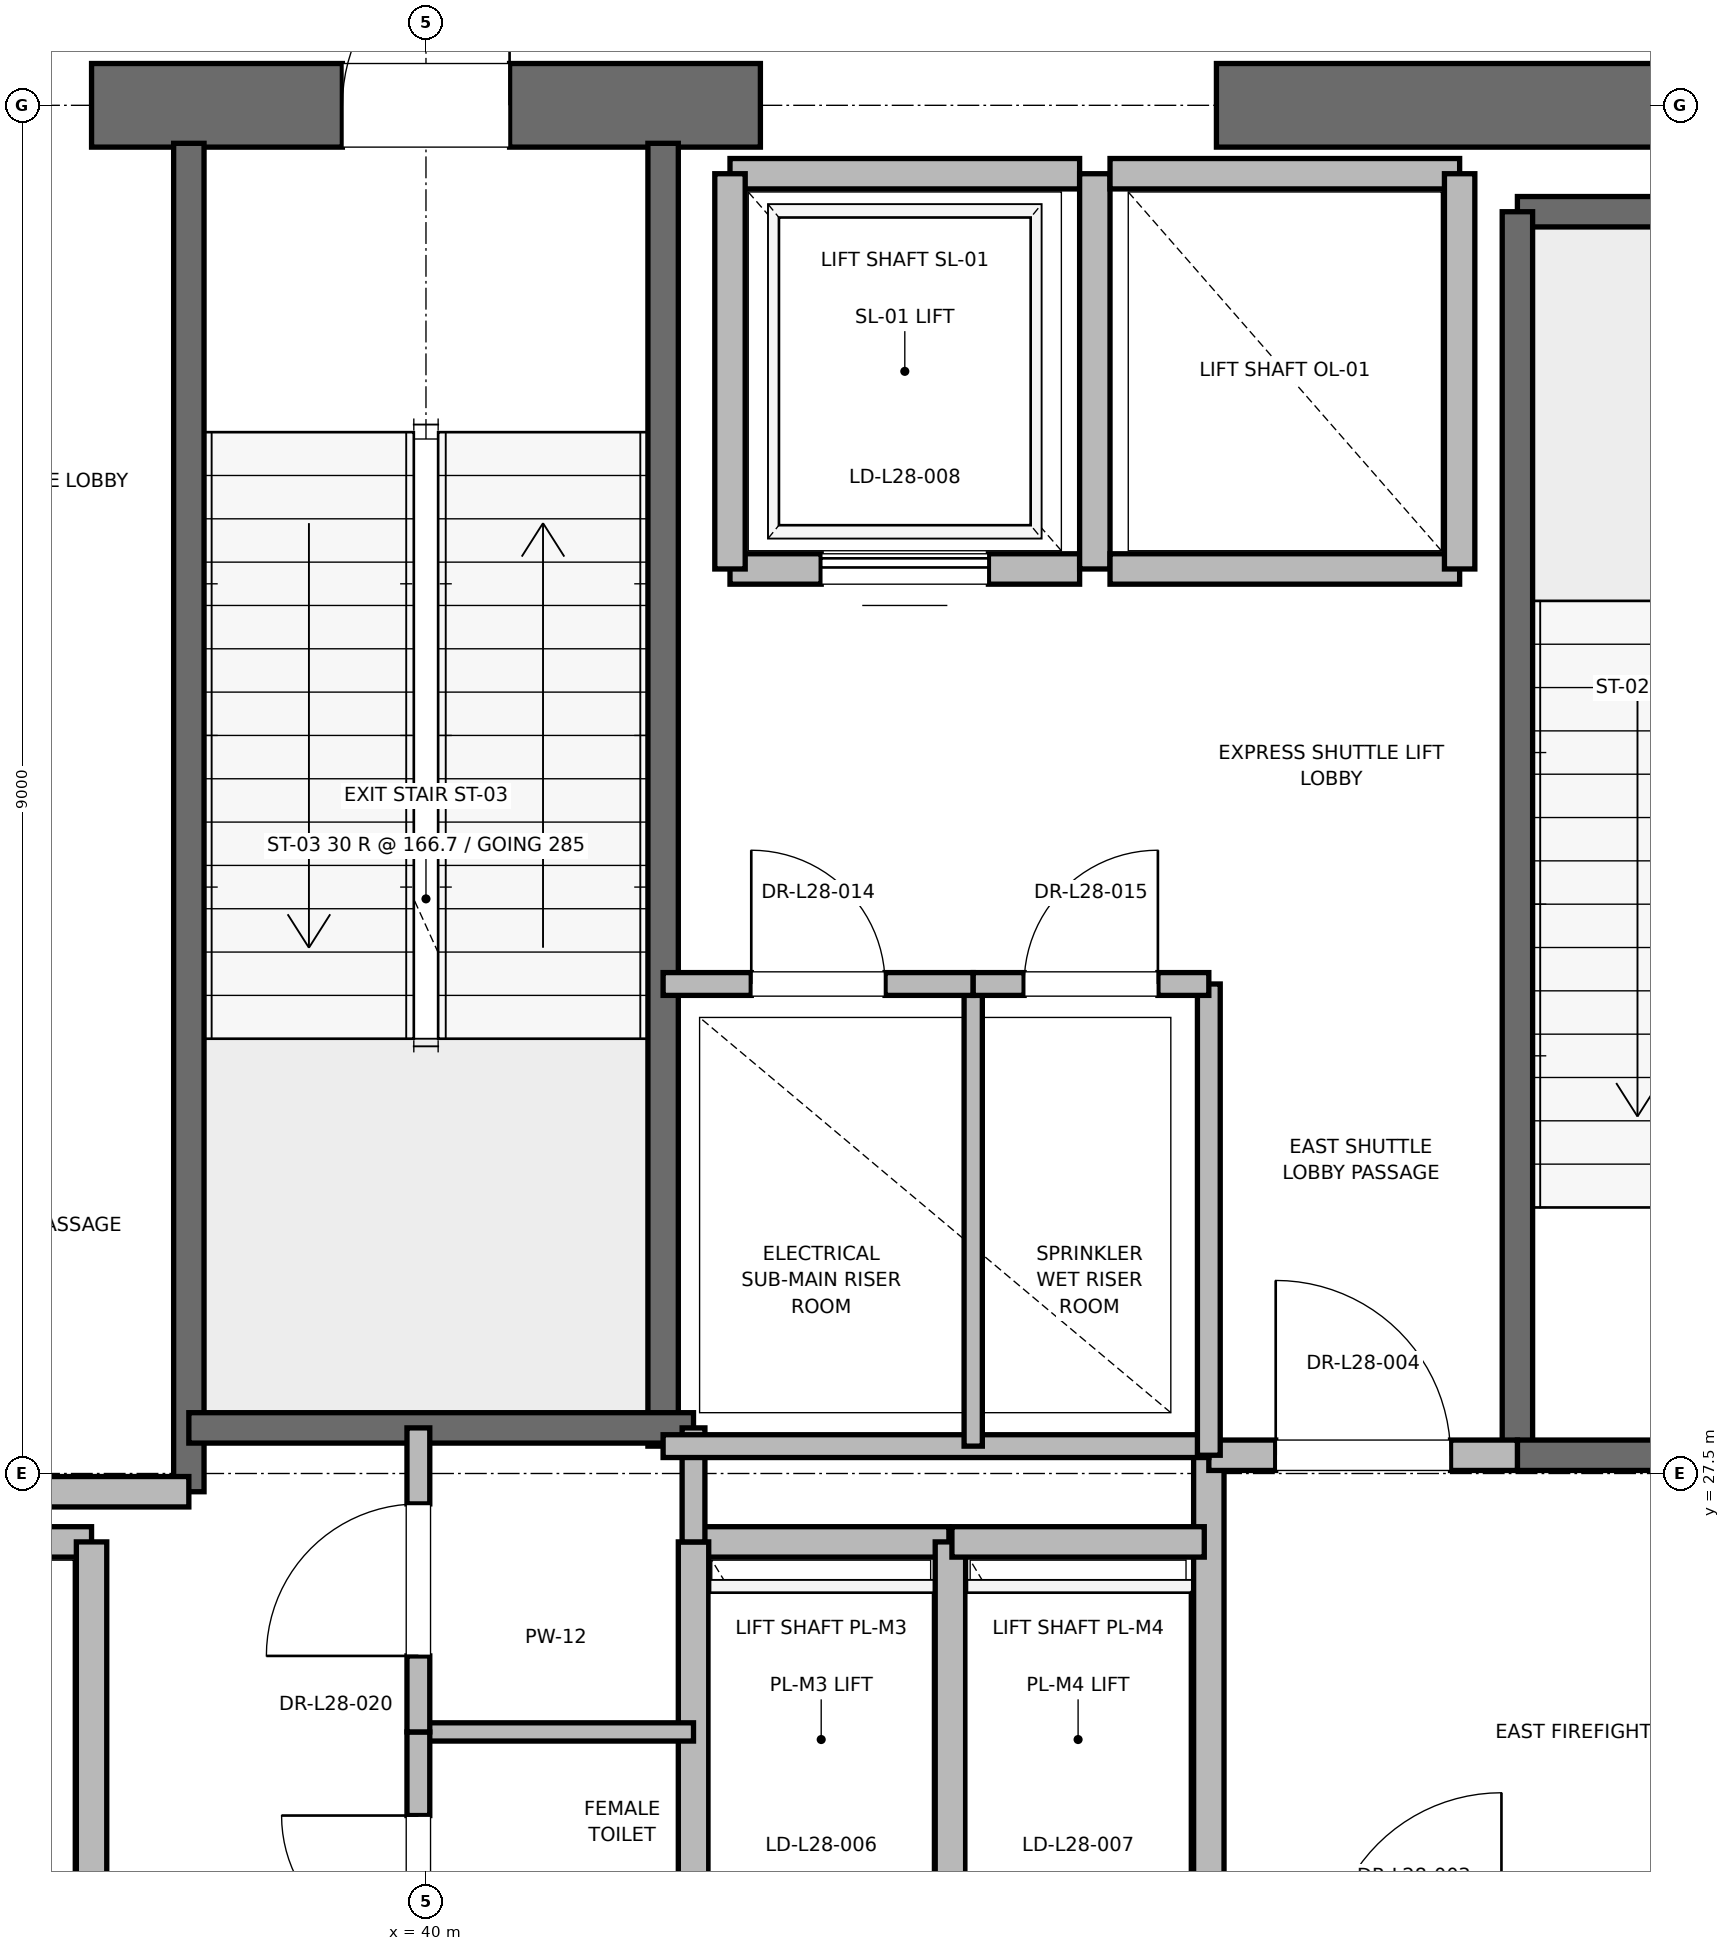
"""IFC4 building model, lengths in metres.
Left out: names, types, materials, properties, quantities, classifications, styles, units other than length and angle.
Written with IfcOpenShell. Run it as: python <this file> out.ifc"""

import sys

from ifc_helpers import new_model, si_unit, direction, frame, frame_2d, origin, place, context, subcontext, project, spatial, rectangle, extrude, element, fill, save


model = new_model("IFC4")
c1 = context("Model", 3, precision=1e-05, world=origin(), true_north=direction((0.0, 1.0)))
c2 = subcontext(c1, "Body", "Model", "MODEL_VIEW")
j1 = project(units=[si_unit("LENGTHUNIT", "METRE"), si_unit("PLANEANGLEUNIT", "RADIAN")], contexts=[c1])
p1 = place(None, origin())
s1 = spatial("IfcSite", under=j1, at=p1, CompositionType="ELEMENT")
p2 = place(p1, origin())
s2 = spatial("IfcBuilding", under=s1, at=p2, CompositionType="ELEMENT")
p3 = place(p2, frame((0.0, 0.0, 123.4)))
s3 = spatial("IfcBuildingStorey", under=s2, at=p3, CompositionType="ELEMENT", Elevation=123.4)
p4 = place(p3, frame((37.8, 36.5, 0.0), z_axis=(0.0, 0.0, 1.0), x_axis=(1.0, 0.0, 0.0)))
e1 = element("IfcWall", 1, at=p4, inside=s3, PredefinedType="SHEAR", context=c2, shape_type="SweptSolid", body=[
    extrude(rectangle(XDim=4.4, YDim=0.55, at=frame_2d((2.2, 0.0))), origin(), (0.0, 0.0, 1.0), 4.775),
])
p5 = place(p4, frame((1.65, 0.0, 0.0)))
e2 = element("IfcOpeningElement", 2, at=p5, cuts=e1, PredefinedType="OPENING", context=c2, shape_type="SweptSolid", body=[
    extrude(rectangle(XDim=1.1, YDim=2.15, at=frame_2d((0.55, 1.075))), frame((0.0, 0.275, 0.0), z_axis=(0.0, -1.0, 0.0), x_axis=(1.0, 0.0, 0.0)), (0.0, 0.0, 1.0), 0.55),
])
p6 = place(p3, frame((45.2, 36.5, 0.0), z_axis=(0.0, 0.0, 1.0), x_axis=(1.0, 0.0, 0.0)))
e3 = element("IfcWall", 3, at=p6, inside=s3, PredefinedType="SHEAR", context=c2, shape_type="SweptSolid", body=[
    extrude(rectangle(XDim=5.8, YDim=0.55, at=frame_2d((2.9, 0.0))), origin(), (0.0, 0.0, 1.0), 4.775),
])
p7 = place(p3, frame((47.18, 35.8, 0.0), z_axis=(0.0, 0.0, 1.0), x_axis=(1.0, 0.0, 0.0)))
e4 = element("IfcWall", 4, at=p7, inside=s3, PredefinedType="SOLIDWALL", context=c2, shape_type="SweptSolid", body=[
    extrude(rectangle(XDim=3.12, YDim=0.2, at=frame_2d((1.56, 0.0))), origin(), (0.0, 0.0, 1.0), 4.775),
])
p8 = place(p3, frame((47.18, 27.62, 0.0), z_axis=(0.0, 0.0, 1.0), x_axis=(0.0, 1.0, 0.0)))
e5 = element("IfcWall", 5, at=p8, inside=s3, PredefinedType="SOLIDWALL", context=c2, shape_type="SweptSolid", body=[
    extrude(rectangle(XDim=8.18, YDim=0.2, at=frame_2d((4.09, 0.0))), origin(), (0.0, 0.0, 1.0), 4.775),
])
p9 = place(p3, frame((47.18, 27.62, 0.0), z_axis=(0.0, 0.0, 1.0), x_axis=(1.0, 0.0, 0.0)))
e6 = element("IfcWall", 6, at=p9, inside=s3, PredefinedType="SOLIDWALL", context=c2, shape_type="SweptSolid", body=[
    extrude(rectangle(XDim=3.12, YDim=0.2, at=frame_2d((1.56, 0.0))), origin(), (0.0, 0.0, 1.0), 4.775),
])
p10 = place(p9, frame((1.01, 0.0, 0.0)))
e7 = element("IfcOpeningElement", 7, at=p10, cuts=e6, PredefinedType="OPENING", context=c2, shape_type="SweptSolid", body=[
    extrude(rectangle(XDim=1.1, YDim=2.15, at=frame_2d((0.55, 1.075))), frame((0.0, 0.1, 0.0), z_axis=(0.0, -1.0, 0.0), x_axis=(1.0, 0.0, 0.0)), (0.0, 0.0, 1.0), 0.2),
])
p11 = place(p3, frame((38.44, 27.38, 0.0), z_axis=(0.0, 0.0, 1.0), x_axis=(0.0, 1.0, 0.0)))
e8 = element("IfcWall", 8, at=p11, inside=s3, PredefinedType="SOLIDWALL", context=c2, shape_type="SweptSolid", body=[
    extrude(rectangle(XDim=8.87, YDim=0.2, at=frame_2d((4.435, 0.0))), origin(), (0.0, 0.0, 1.0), 4.775),
])
p12 = place(p3, frame((41.56, 27.68, 0.0), z_axis=(0.0, 0.0, 1.0), x_axis=(0.0, 1.0, 0.0)))
e9 = element("IfcWall", 9, at=p12, inside=s3, PredefinedType="SOLIDWALL", context=c2, shape_type="SweptSolid", body=[
    extrude(rectangle(XDim=8.57, YDim=0.2, at=frame_2d((4.285, 0.0))), origin(), (0.0, 0.0, 1.0), 4.775),
])
p13 = place(p3, frame((38.44, 27.8, 0.0), z_axis=(0.0, 0.0, 1.0), x_axis=(1.0, 0.0, 0.0)))
e10 = element("IfcWall", 10, at=p13, inside=s3, PredefinedType="SOLIDWALL", context=c2, shape_type="SweptSolid", body=[
    extrude(rectangle(XDim=3.32, YDim=0.2, at=frame_2d((1.66, 0.0))), origin(), (0.0, 0.0, 1.0), 4.775),
])
p14 = place(p3, frame((32.82, 27.38, 0.0), z_axis=(0.0, 0.0, 1.0), x_axis=(1.0, 0.0, 0.0)))
e11 = element("IfcWall", 11, at=p14, inside=s3, PredefinedType="PARTITIONING", context=c2, shape_type="SweptSolid", body=[
    extrude(rectangle(XDim=5.62, YDim=0.2, at=frame_2d((2.81, 0.0))), origin(), (0.0, 0.0, 1.0), 4.775),
])
p15 = place(p3, frame((45.15, 24.25, 0.0), z_axis=(0.0, 0.0, 1.0), x_axis=(0.0, 1.0, 0.0)))
e12 = element("IfcWall", 12, at=p15, inside=s3, PredefinedType="PARTITIONING", context=c2, shape_type="SweptSolid", body=[
    extrude(rectangle(XDim=3.37, YDim=0.2, at=frame_2d((1.685, 0.0))), origin(), (0.0, 0.0, 1.0), 4.775),
])
p16 = place(p3, frame((45.15, 27.62, 0.0), z_axis=(0.0, 0.0, 1.0), x_axis=(1.0, 0.0, 0.0)))
e13 = element("IfcWall", 13, at=p16, inside=s3, PredefinedType="PARTITIONING", context=c2, shape_type="SweptSolid", body=[
    extrude(rectangle(XDim=2.03, YDim=0.2, at=frame_2d((1.015, 0.0))), origin(), (0.0, 0.0, 1.0), 4.775),
])
p17 = place(p16, frame((0.44, 0.0, 0.0)))
e14 = element("IfcOpeningElement", 14, at=p17, cuts=e13, PredefinedType="OPENING", context=c2, shape_type="SweptSolid", body=[
    extrude(rectangle(XDim=1.15, YDim=2.2, at=frame_2d((0.575, 1.1))), frame((0.0, 0.1, 0.0), z_axis=(0.0, -1.0, 0.0), x_axis=(1.0, 0.0, 0.0)), (0.0, 0.0, 1.0), 0.2),
])
p18 = place(p3, frame((37.8, 27.05, 0.0), z_axis=(0.0, 0.0, 1.0), x_axis=(-1.0, 0.0, 0.0)))
e15 = element("IfcWall", 15, at=p18, inside=s3, PredefinedType="SOLIDWALL", context=c2, shape_type="SweptSolid", body=[
    extrude(rectangle(XDim=2.3, YDim=0.2, at=frame_2d((1.15, 0.0))), origin(), (0.0, 0.0, 1.0), 4.775),
])
p19 = place(p3, frame((37.8, 24.45, 0.0), z_axis=(0.0, 0.0, 1.0), x_axis=(0.0, 1.0, 0.0)))
e16 = element("IfcWall", 16, at=p19, inside=s3, PredefinedType="SOLIDWALL", context=c2, shape_type="SweptSolid", body=[
    extrude(rectangle(XDim=2.6, YDim=0.2, at=frame_2d((1.3, 0.0))), origin(), (0.0, 0.0, 1.0), 4.775),
])
p20 = place(p3, frame((43.44, 27.05, 0.0), z_axis=(0.0, 0.0, 1.0), x_axis=(-1.0, 0.0, 0.0)))
e17 = element("IfcWall", 17, at=p20, inside=s3, PredefinedType="SOLIDWALL", context=c2, shape_type="SweptSolid", body=[
    extrude(rectangle(XDim=1.68, YDim=0.2, at=frame_2d((0.84, 0.0))), origin(), (0.0, 0.0, 1.0), 4.775),
])
for number, where, z_axis, x_axis in (
    (18, (41.76, 27.05, 0.0), (0.0, 0.0, 1.0), (0.0, -1.0, 0.0)),
    (19, (43.45, 24.45, 0.0), (0.0, 0.0, 1.0), (0.0, 1.0, 0.0)),
):
    element("IfcWall", number, at=place(p3, frame(where, z_axis=z_axis, x_axis=x_axis)), inside=s3, PredefinedType="SOLIDWALL", context=c2, shape_type="SweptSolid", body=[
        extrude(rectangle(XDim=2.6, YDim=0.2, at=frame_2d((1.3, 0.0))), origin(), (0.0, 0.0, 1.0), 4.775),
    ])
p21 = place(p3, frame((45.12, 27.05, 0.0), z_axis=(0.0, 0.0, 1.0), x_axis=(-1.0, 0.0, 0.0)))
e20 = element("IfcWall", 20, at=p21, inside=s3, PredefinedType="SOLIDWALL", context=c2, shape_type="SweptSolid", body=[
    extrude(rectangle(XDim=1.66, YDim=0.2, at=frame_2d((0.83, 0.0))), origin(), (0.0, 0.0, 1.0), 4.775),
])
p22 = place(p3, frame((42.0, 33.45, 0.0), z_axis=(0.0, 0.0, 1.0), x_axis=(1.0, 0.0, 0.0)))
e21 = element("IfcWall", 21, at=p22, inside=s3, PredefinedType="SOLIDWALL", context=c2, shape_type="SweptSolid", body=[
    extrude(rectangle(XDim=2.3, YDim=0.2, at=frame_2d((1.15, 0.0))), origin(), (0.0, 0.0, 1.0), 4.775),
])
p23 = place(p22, frame((0.6, 0.0, 0.0)))
e22 = element("IfcOpeningElement", 22, at=p23, cuts=e21, PredefinedType="OPENING", context=c2, shape_type="SweptSolid", body=[
    extrude(rectangle(XDim=1.1, YDim=2.2, at=frame_2d((0.55, 1.1))), frame((0.0, 0.1, 0.0), z_axis=(0.0, -1.0, 0.0), x_axis=(1.0, 0.0, 0.0)), (0.0, 0.0, 1.0), 0.2),
])
p24 = place(p3, frame((44.3, 36.05, 0.0), z_axis=(0.0, 0.0, 1.0), x_axis=(-1.0, 0.0, 0.0)))
e23 = element("IfcWall", 23, at=p24, inside=s3, PredefinedType="SOLIDWALL", context=c2, shape_type="SweptSolid", body=[
    extrude(rectangle(XDim=2.3, YDim=0.2, at=frame_2d((1.15, 0.0))), origin(), (0.0, 0.0, 1.0), 3.755),
])
for number, where, z_axis, x_axis in (
    (24, (42.0, 36.05, 0.0), (0.0, 0.0, 1.0), (0.0, -1.0, 0.0)),
    (25, (44.4, 33.45, 0.0), (0.0, 0.0, 1.0), (0.0, 1.0, 0.0)),
):
    element("IfcWall", number, at=place(p3, frame(where, z_axis=z_axis, x_axis=x_axis)), inside=s3, PredefinedType="SOLIDWALL", context=c2, shape_type="SweptSolid", body=[
        extrude(rectangle(XDim=2.6, YDim=0.2, at=frame_2d((1.3, 0.0))), origin(), (0.0, 0.0, 1.0), 3.755),
    ])
p25 = place(p3, frame((44.5, 33.45, 0.0), z_axis=(0.0, 0.0, 1.0), x_axis=(1.0, 0.0, 0.0)))
e26 = element("IfcWall", 26, at=p25, inside=s3, PredefinedType="SOLIDWALL", context=c2, shape_type="SweptSolid", body=[
    extrude(rectangle(XDim=2.3, YDim=0.2, at=frame_2d((1.15, 0.0))), origin(), (0.0, 0.0, 1.0), 4.775),
])
p26 = place(p3, frame((46.8, 36.05, 0.0), z_axis=(0.0, 0.0, 1.0), x_axis=(-1.0, 0.0, 0.0)))
e27 = element("IfcWall", 27, at=p26, inside=s3, PredefinedType="SOLIDWALL", context=c2, shape_type="SweptSolid", body=[
    extrude(rectangle(XDim=2.3, YDim=0.2, at=frame_2d((1.15, 0.0))), origin(), (0.0, 0.0, 1.0), 3.755),
])
p27 = place(p3, frame((46.8, 33.45, 0.0), z_axis=(0.0, 0.0, 1.0), x_axis=(0.0, 1.0, 0.0)))
e28 = element("IfcWall", 28, at=p27, inside=s3, PredefinedType="SOLIDWALL", context=c2, shape_type="SweptSolid", body=[
    extrude(rectangle(XDim=2.6, YDim=0.2, at=frame_2d((1.3, 0.0))), origin(), (0.0, 0.0, 1.0), 4.775),
])
p28 = place(p3, frame((39.95, 25.8, 0.0), z_axis=(0.0, 0.0, 1.0), x_axis=(1.0, 0.0, 0.0)))
e29 = element("IfcWall", 29, at=p28, inside=s3, PredefinedType="PARTITIONING", context=c2, shape_type="SweptSolid", body=[
    extrude(rectangle(XDim=1.81, YDim=0.12, at=frame_2d((0.905, 0.0))), origin(), (0.0, 0.0, 1.0), 2.85),
])
p29 = place(p3, frame((41.76, 27.05, 0.0), z_axis=(0.0, 0.0, 1.0), x_axis=(0.0, 1.0, 0.0)))
e30 = element("IfcWall", 30, at=p29, inside=s3, PredefinedType="PARTITIONING", context=c2, shape_type="SweptSolid", body=[
    extrude(rectangle(XDim=0.75, YDim=0.15, at=frame_2d((0.375, 0.0))), origin(), (0.0, 0.0, 1.0), 2.85),
])
p30 = place(p3, frame((39.95, 23.8, 0.0), z_axis=(0.0, 0.0, 1.0), x_axis=(0.0, 1.0, 0.0)))
e31 = element("IfcWall", 31, at=p30, inside=s3, PredefinedType="PARTITIONING", context=c2, shape_type="SweptSolid", body=[
    extrude(rectangle(XDim=2.0, YDim=0.15, at=frame_2d((1.0, 0.0))), origin(), (0.0, 0.0, 1.0), 2.85),
])
p31 = place(p30, frame((0.55, 0.0, 0.0)))
e32 = element("IfcOpeningElement", 32, at=p31, cuts=e31, PredefinedType="OPENING", context=c2, shape_type="SweptSolid", body=[
    extrude(rectangle(XDim=0.9, YDim=2.1, at=frame_2d((0.45, 1.05))), frame((0.0, 0.075, 0.0), z_axis=(0.0, -1.0, 0.0), x_axis=(1.0, 0.0, 0.0)), (0.0, 0.0, 1.0), 0.15),
])
p32 = place(p3, frame((39.95, 25.8, 0.0), z_axis=(0.0, 0.0, 1.0), x_axis=(0.0, 1.0, 0.0)))
e33 = element("IfcWall", 33, at=p32, inside=s3, PredefinedType="PARTITIONING", context=c2, shape_type="SweptSolid", body=[
    extrude(rectangle(XDim=2.0, YDim=0.15, at=frame_2d((1.0, 0.0))), origin(), (0.0, 0.0, 1.0), 2.85),
])
p33 = place(p32, frame((0.5, 0.0, 0.0)))
e34 = element("IfcOpeningElement", 34, at=p33, cuts=e33, PredefinedType="OPENING", context=c2, shape_type="SweptSolid", body=[
    extrude(rectangle(XDim=1.0, YDim=2.15, at=frame_2d((0.5, 1.075))), frame((0.0, 0.075, 0.0), z_axis=(0.0, -1.0, 0.0), x_axis=(1.0, 0.0, 0.0)), (0.0, 0.0, 1.0), 0.15),
])
p34 = place(p3, frame((41.56, 27.68, 0.0), z_axis=(0.0, 0.0, 1.0), x_axis=(1.0, 0.0, 0.0)))
e35 = element("IfcWall", 35, at=p34, inside=s3, PredefinedType="PARTITIONING", context=c2, shape_type="SweptSolid", body=[
    extrude(rectangle(XDim=3.59, YDim=0.15, at=frame_2d((1.795, 0.0))), origin(), (0.0, 0.0, 1.0), 2.85),
])
p35 = place(p3, frame((45.15, 27.62, 0.0), z_axis=(0.0, 0.0, 1.0), x_axis=(0.0, 1.0, 0.0)))
e36 = element("IfcWall", 36, at=p35, inside=s3, PredefinedType="PARTITIONING", context=c2, shape_type="SweptSolid", body=[
    extrude(rectangle(XDim=3.1, YDim=0.15, at=frame_2d((1.55, 0.0))), origin(), (0.0, 0.0, 1.0), 2.85),
])
p36 = place(p3, frame((43.6, 27.68, 0.0), z_axis=(0.0, 0.0, 1.0), x_axis=(0.0, 1.0, 0.0)))
e37 = element("IfcWall", 37, at=p36, inside=s3, PredefinedType="PARTITIONING", context=c2, shape_type="SweptSolid", body=[
    extrude(rectangle(XDim=3.04, YDim=0.12, at=frame_2d((1.52, 0.0))), origin(), (0.0, 0.0, 1.0), 2.85),
])
p37 = place(p3, frame((41.56, 30.72, 0.0), z_axis=(0.0, 0.0, 1.0), x_axis=(1.0, 0.0, 0.0)))
e38 = element("IfcWall", 38, at=p37, inside=s3, PredefinedType="PARTITIONING", context=c2, shape_type="SweptSolid", body=[
    extrude(rectangle(XDim=2.04, YDim=0.15, at=frame_2d((1.02, 0.0))), origin(), (0.0, 0.0, 1.0), 2.85),
])
p38 = place(p37, frame((0.58, 0.0, 0.0)))
e39 = element("IfcOpeningElement", 39, at=p38, cuts=e38, PredefinedType="OPENING", context=c2, shape_type="SweptSolid", body=[
    extrude(rectangle(XDim=0.88, YDim=2.1, at=frame_2d((0.44, 1.05))), frame((0.0, 0.075, 0.0), z_axis=(0.0, -1.0, 0.0), x_axis=(1.0, 0.0, 0.0)), (0.0, 0.0, 1.0), 0.15),
])
p39 = place(p3, frame((43.6, 30.72, 0.0), z_axis=(0.0, 0.0, 1.0), x_axis=(1.0, 0.0, 0.0)))
e40 = element("IfcWall", 40, at=p39, inside=s3, PredefinedType="PARTITIONING", context=c2, shape_type="SweptSolid", body=[
    extrude(rectangle(XDim=1.55, YDim=0.15, at=frame_2d((0.775, 0.0))), origin(), (0.0, 0.0, 1.0), 2.85),
])
p40 = place(p39, frame((0.335, 0.0, 0.0)))
e41 = element("IfcOpeningElement", 41, at=p40, cuts=e40, PredefinedType="OPENING", context=c2, shape_type="SweptSolid", body=[
    extrude(rectangle(XDim=0.88, YDim=2.1, at=frame_2d((0.44, 1.05))), frame((0.0, 0.075, 0.0), z_axis=(0.0, -1.0, 0.0), x_axis=(1.0, 0.0, 0.0)), (0.0, 0.0, 1.0), 0.15),
])
p41 = place(p5, origin())
e42 = element("IfcDoor", 42, at=p41, inside=s3, OperationType="SINGLE_SWING_RIGHT", PredefinedType="DOOR", context=c2, shape_type="SweptSolid", body=[
    extrude(rectangle(XDim=1.1, YDim=2.15, at=frame_2d((0.55, 1.075))), frame((0.0, 0.025, 0.0), z_axis=(0.0, -1.0, 0.0), x_axis=(1.0, 0.0, 0.0)), (0.0, 0.0, 1.0), 0.05),
])
fill(e2, e42)
p42 = place(p17, origin())
e43 = element("IfcDoor", 43, at=p42, inside=s3, OperationType="SINGLE_SWING_LEFT", PredefinedType="DOOR", context=c2, shape_type="SweptSolid", body=[
    extrude(rectangle(XDim=1.15, YDim=2.2, at=frame_2d((0.575, 1.1))), frame((0.0, 0.025, 0.0), z_axis=(0.0, -1.0, 0.0), x_axis=(1.0, 0.0, 0.0)), (0.0, 0.0, 1.0), 0.05),
])
fill(e14, e43)
p43 = place(p23, origin())
e44 = element("IfcDoor", 44, at=p43, inside=s3, OperationType="SLIDING_TO_RIGHT", PredefinedType="DOOR", context=c2, shape_type="SweptSolid", body=[
    extrude(rectangle(XDim=1.1, YDim=2.2, at=frame_2d((0.55, 1.1))), frame((0.0, 0.025, 0.0), z_axis=(0.0, -1.0, 0.0), x_axis=(1.0, 0.0, 0.0)), (0.0, 0.0, 1.0), 0.05),
])
fill(e22, e44)
p44 = place(p31, origin())
e45 = element("IfcDoor", 45, at=p44, inside=s3, OperationType="SINGLE_SWING_RIGHT", PredefinedType="DOOR", context=c2, shape_type="SweptSolid", body=[
    extrude(rectangle(XDim=0.9, YDim=2.1, at=frame_2d((0.45, 1.05))), frame((0.0, 0.025, 0.0), z_axis=(0.0, -1.0, 0.0), x_axis=(1.0, 0.0, 0.0)), (0.0, 0.0, 1.0), 0.05),
])
fill(e32, e45)
p45 = place(p33, origin())
e46 = element("IfcDoor", 46, at=p45, inside=s3, OperationType="SINGLE_SWING_LEFT", PredefinedType="DOOR", context=c2, shape_type="SweptSolid", body=[
    extrude(rectangle(XDim=1.0, YDim=2.15, at=frame_2d((0.5, 1.075))), frame((0.0, 0.025, 0.0), z_axis=(0.0, -1.0, 0.0), x_axis=(1.0, 0.0, 0.0)), (0.0, 0.0, 1.0), 0.05),
])
fill(e34, e46)
p46 = place(p38, origin())
e47 = element("IfcDoor", 47, at=p46, inside=s3, OperationType="SINGLE_SWING_LEFT", PredefinedType="DOOR", context=c2, shape_type="SweptSolid", body=[
    extrude(rectangle(XDim=0.88, YDim=2.1, at=frame_2d((0.44, 1.05))), frame((0.0, 0.025, 0.0), z_axis=(0.0, -1.0, 0.0), x_axis=(1.0, 0.0, 0.0)), (0.0, 0.0, 1.0), 0.05),
])
fill(e39, e47)
p47 = place(p40, origin())
e48 = element("IfcDoor", 48, at=p47, inside=s3, OperationType="SINGLE_SWING_RIGHT", PredefinedType="DOOR", context=c2, shape_type="SweptSolid", body=[
    extrude(rectangle(XDim=0.88, YDim=2.1, at=frame_2d((0.44, 1.05))), frame((0.0, 0.025, 0.0), z_axis=(0.0, -1.0, 0.0), x_axis=(1.0, 0.0, 0.0)), (0.0, 0.0, 1.0), 0.05),
])
fill(e41, e48)
save(model, sys.argv[1])
